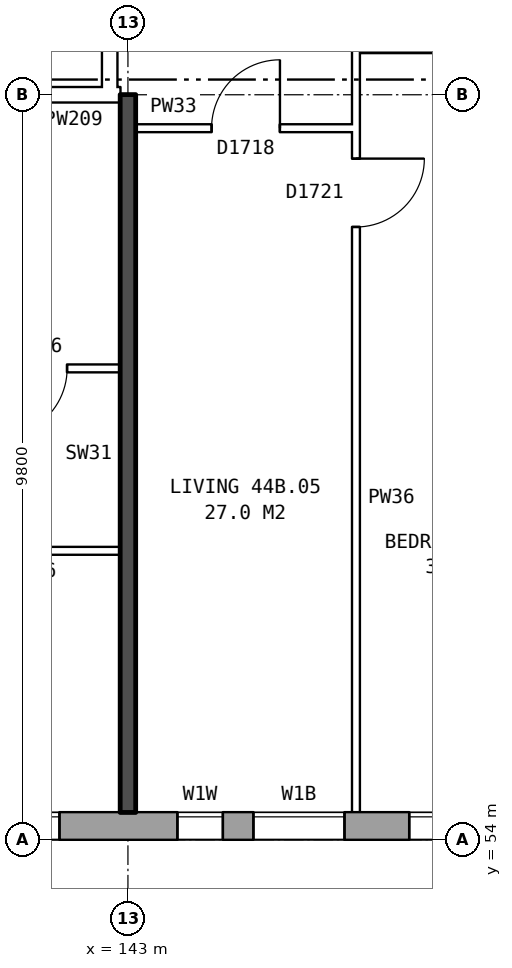
"""IFC4 building model, lengths in metres.
Left out: names, types, materials, properties, quantities, classifications, styles, units other than length and angle.
Written with IfcOpenShell. Run it as: python <this file> out.ifc"""

import sys

from ifc_helpers import new_model, si_unit, direction, frame, frame_2d, origin, place, context, subcontext, project, spatial, rectangle, extrude, element, fill, save


model = new_model("IFC4")
c1 = context("Model", 3, precision=1e-05, world=origin(), true_north=direction((0.0, 1.0)))
c2 = subcontext(c1, "Body", "Model", "MODEL_VIEW")
j1 = project(units=[si_unit("LENGTHUNIT", "METRE"), si_unit("PLANEANGLEUNIT", "RADIAN")], contexts=[c1])
p1 = place(None, origin())
s1 = spatial("IfcSite", under=j1, at=p1, CompositionType="ELEMENT")
p2 = place(p1, origin())
s2 = spatial("IfcBuilding", under=s1, at=p2, CompositionType="ELEMENT")
p3 = place(p2, frame((0.0, 0.0, 157.8)))
s3 = spatial("IfcBuildingStorey", under=s2, at=p3, CompositionType="ELEMENT", Elevation=157.8)
p4 = place(p3, frame((134.075, 54.18, 0.0), z_axis=(0.0, 0.0, 1.0), x_axis=(1.0, 0.0, 0.0)))
e1 = element("IfcWall", 1, at=p4, inside=s3, PredefinedType="STANDARD", context=c2, shape_type="SweptSolid", body=[
    extrude(rectangle(XDim=34.351, YDim=0.36, at=frame_2d((17.175, 0.0))), origin(), (0.0, 0.0, 1.0), 2.85),
])
p5 = place(p4, frame((0.625, 0.0, 0.8)))
e2 = element("IfcOpeningElement", 2, at=p5, cuts=e1, PredefinedType="OPENING", context=c2, shape_type="SweptSolid", body=[
    extrude(rectangle(XDim=1.6, YDim=1.8, at=frame_2d((0.8, 0.9))), frame((0.0, 0.19, 0.0), z_axis=(0.0, -1.0, 0.0), x_axis=(1.0, 0.0, 0.0)), (0.0, 0.0, 1.0), 0.38),
])
p6 = place(p4, frame((3.625, 0.0, 0.8)))
e3 = element("IfcOpeningElement", 3, at=p6, cuts=e1, PredefinedType="OPENING", context=c2, shape_type="SweptSolid", body=[
    extrude(rectangle(XDim=1.6, YDim=1.8, at=frame_2d((0.8, 0.9))), frame((0.0, 0.19, 0.0), z_axis=(0.0, -1.0, 0.0), x_axis=(1.0, 0.0, 0.0)), (0.0, 0.0, 1.0), 0.38),
])
p7 = place(p4, frame((5.525, 0.0, 0.8)))
e4 = element("IfcOpeningElement", 4, at=p7, cuts=e1, PredefinedType="OPENING", context=c2, shape_type="SweptSolid", body=[
    extrude(rectangle(XDim=1.4, YDim=1.8, at=frame_2d((0.7, 0.9))), frame((0.0, 0.19, 0.0), z_axis=(0.0, -1.0, 0.0), x_axis=(1.0, 0.0, 0.0)), (0.0, 0.0, 1.0), 0.38),
])
p8 = place(p4, frame((9.575, 0.0, 0.45)))
e5 = element("IfcOpeningElement", 5, at=p8, cuts=e1, PredefinedType="OPENING", context=c2, shape_type="SweptSolid", body=[
    extrude(rectangle(XDim=0.6, YDim=0.9, at=frame_2d((0.3, 0.45))), frame((0.0, 0.19, 0.0), z_axis=(0.0, -1.0, 0.0), x_axis=(1.0, 0.0, 0.0)), (0.0, 0.0, 1.0), 0.38),
])
p9 = place(p4, frame((12.625, 0.0, 0.8)))
e6 = element("IfcOpeningElement", 6, at=p9, cuts=e1, PredefinedType="OPENING", context=c2, shape_type="SweptSolid", body=[
    extrude(rectangle(XDim=1.6, YDim=1.8, at=frame_2d((0.8, 0.9))), frame((0.0, 0.19, 0.0), z_axis=(0.0, -1.0, 0.0), x_axis=(1.0, 0.0, 0.0)), (0.0, 0.0, 1.0), 0.38),
])
p10 = place(p4, frame((15.625, 0.0, 0.8)))
e7 = element("IfcOpeningElement", 7, at=p10, cuts=e1, PredefinedType="OPENING", context=c2, shape_type="SweptSolid", body=[
    extrude(rectangle(XDim=1.6, YDim=1.8, at=frame_2d((0.8, 0.9))), frame((0.0, 0.19, 0.0), z_axis=(0.0, -1.0, 0.0), x_axis=(1.0, 0.0, 0.0)), (0.0, 0.0, 1.0), 0.38),
])
p11 = place(p4, frame((18.625, 0.0, 0.8)))
e8 = element("IfcOpeningElement", 8, at=p11, cuts=e1, PredefinedType="OPENING", context=c2, shape_type="SweptSolid", body=[
    extrude(rectangle(XDim=1.6, YDim=1.8, at=frame_2d((0.8, 0.9))), frame((0.0, 0.19, 0.0), z_axis=(0.0, -1.0, 0.0), x_axis=(1.0, 0.0, 0.0)), (0.0, 0.0, 1.0), 0.38),
])
p12 = place(p4, frame((21.625, 0.0, 0.8)))
e9 = element("IfcOpeningElement", 9, at=p12, cuts=e1, PredefinedType="OPENING", context=c2, shape_type="SweptSolid", body=[
    extrude(rectangle(XDim=1.6, YDim=1.8, at=frame_2d((0.8, 0.9))), frame((0.0, 0.19, 0.0), z_axis=(0.0, -1.0, 0.0), x_axis=(1.0, 0.0, 0.0)), (0.0, 0.0, 1.0), 0.38),
])
p13 = place(p4, frame((23.525, 0.0, 0.8)))
e10 = element("IfcOpeningElement", 10, at=p13, cuts=e1, PredefinedType="OPENING", context=c2, shape_type="SweptSolid", body=[
    extrude(rectangle(XDim=0.8, YDim=0.9, at=frame_2d((0.4, 0.45))), frame((0.0, 0.19, 0.0), z_axis=(0.0, -1.0, 0.0), x_axis=(1.0, 0.0, 0.0)), (0.0, 0.0, 1.0), 0.38),
])
p14 = place(p4, frame((27.625, 0.0, 0.8)))
e11 = element("IfcOpeningElement", 11, at=p14, cuts=e1, PredefinedType="OPENING", context=c2, shape_type="SweptSolid", body=[
    extrude(rectangle(XDim=1.6, YDim=1.8, at=frame_2d((0.8, 0.9))), frame((0.0, 0.19, 0.0), z_axis=(0.0, -1.0, 0.0), x_axis=(1.0, 0.0, 0.0)), (0.0, 0.0, 1.0), 0.38),
])
p15 = place(p4, frame((30.625, 0.0, 0.8)))
e12 = element("IfcOpeningElement", 12, at=p15, cuts=e1, PredefinedType="OPENING", context=c2, shape_type="SweptSolid", body=[
    extrude(rectangle(XDim=1.6, YDim=1.8, at=frame_2d((0.8, 0.9))), frame((0.0, 0.19, 0.0), z_axis=(0.0, -1.0, 0.0), x_axis=(1.0, 0.0, 0.0)), (0.0, 0.0, 1.0), 0.38),
])
p16 = place(p4, frame((7.225, 0.0, 1.0)))
e13 = element("IfcOpeningElement", 13, at=p16, cuts=e1, PredefinedType="OPENING", context=c2, shape_type="SweptSolid", body=[
    extrude(rectangle(XDim=0.8, YDim=1.5, at=frame_2d((0.4, 0.75))), frame((0.0, 0.19, 0.0), z_axis=(0.0, -1.0, 0.0), x_axis=(1.0, 0.0, 0.0)), (0.0, 0.0, 1.0), 0.38),
])
p17 = place(p4, frame((10.575, 0.0, 0.45)))
e14 = element("IfcOpeningElement", 14, at=p17, cuts=e1, PredefinedType="OPENING", context=c2, shape_type="SweptSolid", body=[
    extrude(rectangle(XDim=1.2, YDim=1.8, at=frame_2d((0.6, 0.9))), frame((0.0, 0.19, 0.0), z_axis=(0.0, -1.0, 0.0), x_axis=(1.0, 0.0, 0.0)), (0.0, 0.0, 1.0), 0.38),
])
p18 = place(p4, frame((25.525, 0.0, 1.7)))
e15 = element("IfcOpeningElement", 15, at=p18, cuts=e1, PredefinedType="OPENING", context=c2, shape_type="SweptSolid", body=[
    extrude(rectangle(XDim=1.2, YDim=0.9, at=frame_2d((0.6, 0.45))), frame((0.0, 0.19, 0.0), z_axis=(0.0, -1.0, 0.0), x_axis=(1.0, 0.0, 0.0)), (0.0, 0.0, 1.0), 0.38),
])
p19 = place(p3, frame((142.76, 63.9, 0.0), z_axis=(0.0, 0.0, 1.0), x_axis=(0.0, 1.0, 0.0)))
e16 = element("IfcWall", 16, at=p19, inside=s3, PredefinedType="PARTITIONING", context=c2, shape_type="SweptSolid", body=[
    extrude(rectangle(XDim=12.2, YDim=0.2, at=frame_2d((6.1, 0.0))), origin(), (0.0, 0.0, 1.0), 2.85),
])
p20 = place(p19, frame((5.1, 0.0, 0.0)))
e17 = element("IfcOpeningElement", 17, at=p20, cuts=e16, PredefinedType="OPENING", context=c2, shape_type="SweptSolid", body=[
    extrude(rectangle(XDim=2.0, YDim=2.1, at=frame_2d((1.0, 1.05))), frame((0.0, 0.11, 0.0), z_axis=(0.0, -1.0, 0.0), x_axis=(1.0, 0.0, 0.0)), (0.0, 0.0, 1.0), 0.22),
])
p21 = place(p3, frame((140.6, 57.8, 0.0), z_axis=(0.0, 0.0, 1.0), x_axis=(1.0, 0.0, 0.0)))
e18 = element("IfcWall", 18, at=p21, inside=s3, PredefinedType="PARTITIONING", context=c2, shape_type="SweptSolid", body=[
    extrude(rectangle(XDim=2.3, YDim=0.1, at=frame_2d((1.15, 0.0))), origin(), (0.0, 0.0, 1.0), 2.85),
])
p22 = place(p3, frame((137.1, 60.2, 0.0), z_axis=(0.0, 0.0, 1.0), x_axis=(1.0, 0.0, 0.0)))
e19 = element("IfcWall", 19, at=p22, inside=s3, PredefinedType="PARTITIONING", context=c2, shape_type="SweptSolid", body=[
    extrude(rectangle(XDim=5.8, YDim=0.1, at=frame_2d((2.9, 0.0))), origin(), (0.0, 0.0, 1.0), 2.85),
])
p23 = place(p22, frame((1.3, 0.0, 0.0)))
e20 = element("IfcOpeningElement", 20, at=p23, cuts=e19, PredefinedType="OPENING", context=c2, shape_type="SweptSolid", body=[
    extrude(rectangle(XDim=0.9, YDim=2.1, at=frame_2d((0.45, 1.05))), frame((0.0, 0.06, 0.0), z_axis=(0.0, -1.0, 0.0), x_axis=(1.0, 0.0, 0.0)), (0.0, 0.0, 1.0), 0.12),
])
p24 = place(p22, frame((4.2, 0.0, 0.0)))
e21 = element("IfcOpeningElement", 21, at=p24, cuts=e19, PredefinedType="OPENING", context=c2, shape_type="SweptSolid", body=[
    extrude(rectangle(XDim=0.9, YDim=2.1, at=frame_2d((0.45, 1.05))), frame((0.0, 0.06, 0.0), z_axis=(0.0, -1.0, 0.0), x_axis=(1.0, 0.0, 0.0)), (0.0, 0.0, 1.0), 0.12),
])
p25 = place(p3, frame((143.1, 63.36, 0.0), z_axis=(0.0, 0.0, 1.0), x_axis=(1.0, 0.0, 0.0)))
e22 = element("IfcWall", 22, at=p25, inside=s3, PredefinedType="PARTITIONING", context=c2, shape_type="SweptSolid", body=[
    extrude(rectangle(XDim=2.9, YDim=0.1, at=frame_2d((1.45, 0.0))), origin(), (0.0, 0.0, 1.0), 2.85),
])
p26 = place(p25, frame((1.0, 0.0, 0.0)))
e23 = element("IfcOpeningElement", 23, at=p26, cuts=e22, PredefinedType="OPENING", context=c2, shape_type="SweptSolid", body=[
    extrude(rectangle(XDim=0.9, YDim=2.1, at=frame_2d((0.45, 1.05))), frame((0.0, 0.06, 0.0), z_axis=(0.0, -1.0, 0.0), x_axis=(1.0, 0.0, 0.0)), (0.0, 0.0, 1.0), 0.12),
])
p27 = place(p3, frame((139.76, 63.8, 0.0), z_axis=(0.0, 0.0, 1.0), x_axis=(1.0, 0.0, 0.0)))
e24 = element("IfcWall", 24, at=p27, inside=s3, PredefinedType="PARTITIONING", context=c2, shape_type="SweptSolid", body=[
    extrude(rectangle(XDim=3.0, YDim=0.2, at=frame_2d((1.5, 0.0))), origin(), (0.0, 0.0, 1.0), 2.85),
])
p28 = place(p27, frame((1.0, 0.0, 0.0)))
e25 = element("IfcOpeningElement", 25, at=p28, cuts=e24, PredefinedType="OPENING", context=c2, shape_type="SweptSolid", body=[
    extrude(rectangle(XDim=1.0, YDim=2.1, at=frame_2d((0.5, 1.05))), frame((0.0, 0.11, 0.0), z_axis=(0.0, -1.0, 0.0), x_axis=(1.0, 0.0, 0.0)), (0.0, 0.0, 1.0), 0.22),
])
p29 = place(p3, frame((142.76, 63.8, 0.0), z_axis=(0.0, 0.0, 1.0), x_axis=(1.0, 0.0, 0.0)))
e26 = element("IfcWall", 26, at=p29, inside=s3, PredefinedType="PARTITIONING", context=c2, shape_type="SweptSolid", body=[
    extrude(rectangle(XDim=0.14, YDim=0.2, at=frame_2d((0.07, 0.0))), origin(), (0.0, 0.0, 1.0), 2.85),
])
p30 = place(p3, frame((146.0, 64.4, 0.0), z_axis=(0.0, 0.0, 1.0), x_axis=(1.0, 0.0, 0.0)))
e27 = element("IfcWall", 27, at=p30, inside=s3, PredefinedType="PARTITIONING", context=c2, shape_type="SweptSolid", body=[
    extrude(rectangle(XDim=2.9, YDim=0.1, at=frame_2d((1.45, 0.0))), origin(), (0.0, 0.0, 1.0), 2.85),
])
p31 = place(p3, frame((143.0, 54.36, 0.0), z_axis=(0.0, 0.0, 1.0), x_axis=(0.0, 1.0, 0.0)))
e28 = element("IfcWall", 28, at=p31, inside=s3, PredefinedType="SOLIDWALL", context=c2, shape_type="SweptSolid", body=[
    extrude(rectangle(XDim=9.44, YDim=0.2, at=frame_2d((4.72, 0.0))), origin(), (0.0, 0.0, 1.0), 2.85),
])
p32 = place(p3, frame((146.0, 54.36, 0.0), z_axis=(0.0, 0.0, 1.0), x_axis=(0.0, 1.0, 0.0)))
e29 = element("IfcWall", 29, at=p32, inside=s3, PredefinedType="PARTITIONING", context=c2, shape_type="SweptSolid", body=[
    extrude(rectangle(XDim=14.34, YDim=0.1, at=frame_2d((7.17, 0.0))), origin(), (0.0, 0.0, 1.0), 2.85),
])
p33 = place(p32, frame((7.7, 0.0, 0.0)))
e30 = element("IfcOpeningElement", 30, at=p33, cuts=e29, PredefinedType="OPENING", context=c2, shape_type="SweptSolid", body=[
    extrude(rectangle(XDim=0.9, YDim=2.1, at=frame_2d((0.45, 1.05))), frame((0.0, 0.06, 0.0), z_axis=(0.0, -1.0, 0.0), x_axis=(1.0, 0.0, 0.0)), (0.0, 0.0, 1.0), 0.12),
])
p34 = place(p32, frame((13.04, 0.0, 0.0)))
e31 = element("IfcOpeningElement", 31, at=p34, cuts=e29, PredefinedType="OPENING", context=c2, shape_type="SweptSolid", body=[
    extrude(rectangle(XDim=0.9, YDim=2.1, at=frame_2d((0.45, 1.05))), frame((0.0, 0.06, 0.0), z_axis=(0.0, -1.0, 0.0), x_axis=(1.0, 0.0, 0.0)), (0.0, 0.0, 1.0), 0.12),
])
p35 = place(p8, origin())
e32 = element("IfcWindow", 32, at=p35, inside=s3, PartitioningType="SINGLE_PANEL", PredefinedType="WINDOW", context=c2, shape_type="SweptSolid", body=[
    extrude(rectangle(XDim=0.6, YDim=0.9, at=frame_2d((0.3, 0.45))), frame((0.0, 0.15, 0.0), z_axis=(0.0, -1.0, 0.0), x_axis=(1.0, 0.0, 0.0)), (0.0, 0.0, 1.0), 0.06),
])
fill(e5, e32)
p36 = place(p9, origin())
e33 = element("IfcWindow", 33, at=p36, inside=s3, PartitioningType="SINGLE_PANEL", PredefinedType="WINDOW", context=c2, shape_type="SweptSolid", body=[
    extrude(rectangle(XDim=1.6, YDim=1.8, at=frame_2d((0.8, 0.9))), frame((0.0, 0.15, 0.0), z_axis=(0.0, -1.0, 0.0), x_axis=(1.0, 0.0, 0.0)), (0.0, 0.0, 1.0), 0.06),
])
fill(e6, e33)
p37 = place(p24, frame((0.9, 0.0, 0.0), z_axis=(0.0, 0.0, 1.0), x_axis=(-1.0, 0.0, 0.0)))
e34 = element("IfcDoor", 34, at=p37, inside=s3, OperationType="SINGLE_SWING_RIGHT", PredefinedType="DOOR", context=c2, shape_type="SweptSolid", body=[
    extrude(rectangle(XDim=0.9, YDim=2.1, at=frame_2d((0.45, 1.05))), frame((0.0, 0.025, 0.0), z_axis=(0.0, -1.0, 0.0), x_axis=(1.0, 0.0, 0.0)), (0.0, 0.0, 1.0), 0.05),
])
fill(e21, e34)
p38 = place(p33, frame((0.9, 0.0, 0.0), z_axis=(0.0, 0.0, 1.0), x_axis=(-1.0, 0.0, 0.0)))
e35 = element("IfcDoor", 35, at=p38, inside=s3, OperationType="SINGLE_SWING_LEFT", PredefinedType="DOOR", context=c2, shape_type="SweptSolid", body=[
    extrude(rectangle(XDim=0.9, YDim=2.1, at=frame_2d((0.45, 1.05))), frame((0.0, 0.025, 0.0), z_axis=(0.0, -1.0, 0.0), x_axis=(1.0, 0.0, 0.0)), (0.0, 0.0, 1.0), 0.05),
])
fill(e30, e35)
p39 = place(p26, origin())
e36 = element("IfcDoor", 36, at=p39, inside=s3, OperationType="SINGLE_SWING_RIGHT", PredefinedType="DOOR", context=c2, shape_type="SweptSolid", body=[
    extrude(rectangle(XDim=0.9, YDim=2.1, at=frame_2d((0.45, 1.05))), frame((0.0, 0.025, 0.0), z_axis=(0.0, -1.0, 0.0), x_axis=(1.0, 0.0, 0.0)), (0.0, 0.0, 1.0), 0.05),
])
fill(e23, e36)
p40 = place(p16, origin())
e37 = element("IfcWindow", 37, at=p40, inside=s3, PartitioningType="SINGLE_PANEL", PredefinedType="WINDOW", context=c2, shape_type="SweptSolid", body=[
    extrude(rectangle(XDim=0.8, YDim=1.5, at=frame_2d((0.4, 0.75))), frame((0.0, 0.15, 0.0), z_axis=(0.0, -1.0, 0.0), x_axis=(1.0, 0.0, 0.0)), (0.0, 0.0, 1.0), 0.06),
])
fill(e13, e37)
p41 = place(p17, origin())
e38 = element("IfcWindow", 38, at=p41, inside=s3, PartitioningType="SINGLE_PANEL", PredefinedType="WINDOW", context=c2, shape_type="SweptSolid", body=[
    extrude(rectangle(XDim=1.2, YDim=1.8, at=frame_2d((0.6, 0.9))), frame((0.0, 0.15, 0.0), z_axis=(0.0, -1.0, 0.0), x_axis=(1.0, 0.0, 0.0)), (0.0, 0.0, 1.0), 0.06),
])
fill(e14, e38)
save(model, sys.argv[1])
